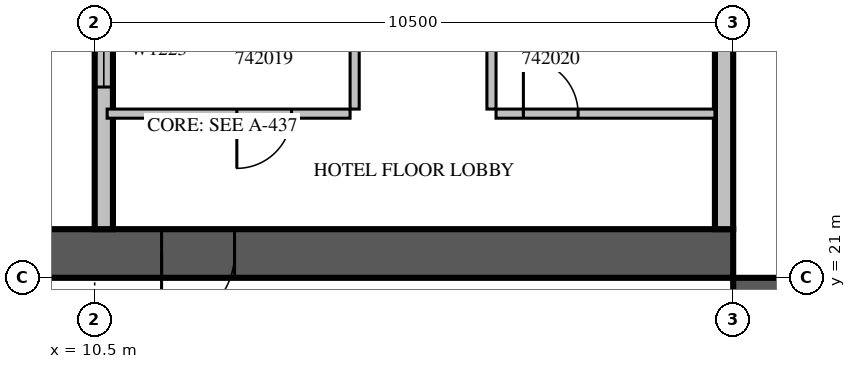
"""IFC4 building model, lengths in metres.
Left out: names, types, materials, properties, quantities, classifications, styles, units other than length and angle.
Written with IfcOpenShell. Run it as: python <this file> out.ifc"""

import sys

from ifc_helpers import new_model, si_unit, direction, frame, frame_2d, origin, place, context, subcontext, project, spatial, rectangle, extrude, source, transform, mapped, element, fill, save


model = new_model("IFC4")
c1 = context("Model", 3, precision=1e-05, world=origin(), true_north=direction((0.0, 1.0)))
c2 = subcontext(c1, "Body", "Model", "MODEL_VIEW")
j1 = project(units=[si_unit("LENGTHUNIT", "METRE"), si_unit("PLANEANGLEUNIT", "RADIAN")], contexts=[c1])
p1 = place(None, origin())
s1 = spatial("IfcSite", under=j1, at=p1, CompositionType="ELEMENT")
p2 = place(p1, origin())
s2 = spatial("IfcBuilding", under=s1, at=p2, CompositionType="ELEMENT")
p3 = place(p2, frame((0.0, 0.0, 193.0)))
s3 = spatial("IfcBuildingStorey", under=s2, at=p3, CompositionType="ELEMENT", Elevation=193.0)
m1 = source(origin(), c2, "Body", "SweptSolid", [
    extrude(rectangle(XDim=16.8, YDim=0.8, at=frame_2d((8.4, 0.0))), origin(), (0.0, 0.0, 1.0), 3.8),
])
p4 = place(p3, frame((21.4, 4.2, 0.0), z_axis=(0.0, 0.0, 1.0), x_axis=(0.0, 1.0, 0.0)))
e1 = element("IfcWall", 1, at=p4, inside=s3, PredefinedType="SHEAR", context=c2, shape_type="MappedRepresentation", body=[
    mapped(m1, transform((0.0, 0.0, 0.0), scale=1.0)),
])
m2 = source(origin(), c2, "Body", "SweptSolid", [
    extrude(rectangle(XDim=2.2, YDim=2.1, at=frame_2d((1.1, 1.05))), frame((0.0, 0.41, 0.0), z_axis=(0.0, -1.0, 0.0), x_axis=(1.0, 0.0, 0.0)), (0.0, 0.0, 1.0), 0.82),
])
p5 = place(p4, frame((4.2, 0.0, 0.0)))
e2 = element("IfcOpeningElement", 2, at=p5, cuts=e1, PredefinedType="OPENING", context=c2, shape_type="MappedRepresentation", body=[
    mapped(m2, transform((0.0, 0.0, 0.0), scale=1.0)),
])
m3 = source(origin(), c2, "Body", "SweptSolid", [
    extrude(rectangle(XDim=1.2, YDim=2.1, at=frame_2d((0.6, 1.05))), frame((0.0, 0.41, 0.0), z_axis=(0.0, -1.0, 0.0), x_axis=(1.0, 0.0, 0.0)), (0.0, 0.0, 1.0), 0.82),
])
p6 = place(p4, frame((14.7, 0.0, 0.0)))
e3 = element("IfcOpeningElement", 3, at=p6, cuts=e1, PredefinedType="OPENING", context=c2, shape_type="MappedRepresentation", body=[
    mapped(m3, transform((0.0, 0.0, 0.0), scale=1.0)),
])
p7 = place(p3, frame((4.2, 21.4, 0.0), z_axis=(0.0, 0.0, 1.0), x_axis=(1.0, 0.0, 0.0)))
e4 = element("IfcWall", 4, at=p7, inside=s3, PredefinedType="SHEAR", context=c2, shape_type="MappedRepresentation", body=[
    mapped(m1, transform((0.0, 0.0, 0.0), scale=1.0)),
])
p8 = place(p7, frame((7.4, 0.0, 0.0)))
e5 = element("IfcOpeningElement", 5, at=p8, cuts=e4, PredefinedType="OPENING", context=c2, shape_type="MappedRepresentation", body=[
    mapped(m3, transform((0.0, 0.0, 0.0), scale=1.0)),
])
m4 = source(origin(), c2, "Body", "SweptSolid", [
    extrude(rectangle(XDim=7.15, YDim=0.3, at=frame_2d((3.575, 0.0))), origin(), (0.0, 0.0, 1.0), 3.4),
])
p9 = place(p3, frame((20.85, 21.8, 0.0), z_axis=(0.0, 0.0, 1.0), x_axis=(0.0, 1.0, 0.0)))
e6 = element("IfcWall", 6, at=p9, inside=s3, PredefinedType="STANDARD", context=c2, shape_type="MappedRepresentation", body=[
    mapped(m4, transform((0.0, 0.0, 0.0), scale=1.0)),
])
m5 = source(origin(), c2, "Body", "SweptSolid", [
    extrude(rectangle(XDim=3.0, YDim=2.3, at=frame_2d((1.5, 1.15))), frame((0.0, 0.16, 0.0), z_axis=(0.0, -1.0, 0.0), x_axis=(1.0, 0.0, 0.0)), (0.0, 0.0, 1.0), 0.32),
])
p10 = place(p9, frame((4.0, 0.0, 0.6)))
e7 = element("IfcOpeningElement", 7, at=p10, cuts=e6, PredefinedType="OPENING", context=c2, shape_type="MappedRepresentation", body=[
    mapped(m5, transform((0.0, 0.0, 0.0), scale=1.0)),
])
p11 = place(p3, frame((10.65, 28.95, 0.0), z_axis=(0.0, 0.0, 1.0), x_axis=(0.0, -1.0, 0.0)))
e8 = element("IfcWall", 8, at=p11, inside=s3, PredefinedType="STANDARD", context=c2, shape_type="MappedRepresentation", body=[
    mapped(m4, transform((0.0, 0.0, 0.0), scale=1.0)),
])
m6 = source(origin(), c2, "Body", "SweptSolid", [
    extrude(rectangle(XDim=1.8, YDim=2.3, at=frame_2d((0.9, 1.15))), frame((0.0, 0.16, 0.0), z_axis=(0.0, -1.0, 0.0), x_axis=(1.0, 0.0, 0.0)), (0.0, 0.0, 1.0), 0.32),
])
p12 = place(p11, frame((0.15, 0.0, 0.6)))
e9 = element("IfcOpeningElement", 9, at=p12, cuts=e8, PredefinedType="OPENING", context=c2, shape_type="MappedRepresentation", body=[
    mapped(m6, transform((0.0, 0.0, 0.0), scale=1.0)),
])
m7 = source(origin(), c2, "Body", "SweptSolid", [
    extrude(rectangle(XDim=1.2, YDim=2.3, at=frame_2d((0.6, 1.15))), frame((0.0, 0.16, 0.0), z_axis=(0.0, -1.0, 0.0), x_axis=(1.0, 0.0, 0.0)), (0.0, 0.0, 1.0), 0.32),
])
p13 = place(p11, frame((3.612, 0.0, 0.6)))
e10 = element("IfcOpeningElement", 10, at=p13, cuts=e8, PredefinedType="OPENING", context=c2, shape_type="MappedRepresentation", body=[
    mapped(m7, transform((0.0, 0.0, 0.0), scale=1.0)),
])
p14 = place(p3, frame((10.705, 23.7, 0.0), z_axis=(0.0, 0.0, 1.0), x_axis=(1.0, 0.0, 0.0)))
e11 = element("IfcWall", 11, at=p14, inside=s3, PredefinedType="PARTITIONING", context=c2, shape_type="SweptSolid", body=[
    extrude(rectangle(XDim=3.995, YDim=0.15, at=frame_2d((1.998, 0.0))), origin(), (0.0, 0.0, 1.0), 3.4),
])
m8 = source(origin(), c2, "Body", "SweptSolid", [
    extrude(rectangle(XDim=0.9, YDim=2.1, at=frame_2d((0.45, 1.05))), frame((0.0, 0.085, 0.0), z_axis=(0.0, -1.0, 0.0), x_axis=(1.0, 0.0, 0.0)), (0.0, 0.0, 1.0), 0.17),
])
p15 = place(p14, frame((2.132, 0.0, 0.0)))
e12 = element("IfcOpeningElement", 12, at=p15, cuts=e11, PredefinedType="OPENING", context=c2, shape_type="MappedRepresentation", body=[
    mapped(m8, transform((0.0, 0.0, 0.0), scale=1.0)),
])
m9 = source(origin(), c2, "Body", "SweptSolid", [
    extrude(rectangle(XDim=3.6, YDim=0.15, at=frame_2d((1.8, 0.0))), origin(), (0.0, 0.0, 1.0), 3.4),
])
p16 = place(p3, frame((17.1, 23.7, 0.0), z_axis=(0.0, 0.0, 1.0), x_axis=(1.0, 0.0, 0.0)))
e13 = element("IfcWall", 13, at=p16, inside=s3, PredefinedType="PARTITIONING", context=c2, shape_type="MappedRepresentation", body=[
    mapped(m9, transform((0.0, 0.0, 0.0), scale=1.0)),
])
p17 = place(p16, frame((0.45, 0.0, 0.0)))
e14 = element("IfcOpeningElement", 14, at=p17, cuts=e13, PredefinedType="OPENING", context=c2, shape_type="MappedRepresentation", body=[
    mapped(m8, transform((0.0, 0.0, 0.0), scale=1.0)),
])
m10 = source(origin(), c2, "Body", "SweptSolid", [
    extrude(rectangle(XDim=5.55, YDim=0.15, at=frame_2d((2.775, 0.0))), origin(), (0.0, 0.0, 1.0), 3.4),
])
for number, where, z_axis, x_axis in (
    (15, (14.775, 23.775, 0.0), (0.0, 0.0, 1.0), (0.0, 1.0, 0.0)),
    (16, (17.025, 29.325, 0.0), (0.0, 0.0, 1.0), (0.0, -1.0, 0.0)),
):
    element("IfcWall", number, at=place(p3, frame(where, z_axis=z_axis, x_axis=x_axis)), inside=s3, PredefinedType="PARTITIONING", context=c2, shape_type="MappedRepresentation", body=[
        mapped(m10, transform((0.0, 0.0, 0.0), scale=1.0)),
    ])
m11 = source(origin(), c2, "Body", "SweptSolid", [
    extrude(rectangle(XDim=1.2, YDim=2.3, at=frame_2d((0.6, 1.15))), frame((0.0, 0.03, 0.0), z_axis=(0.0, -1.0, 0.0), x_axis=(1.0, 0.0, 0.0)), (0.0, 0.0, 1.0), 0.06),
])
p18 = place(p13, origin())
e17 = element("IfcWindow", 17, at=p18, inside=s3, PartitioningType="SINGLE_PANEL", PredefinedType="WINDOW", context=c2, shape_type="MappedRepresentation", body=[
    mapped(m11, transform((0.0, 0.0, 0.0), scale=1.0)),
])
fill(e10, e17)
m12 = source(origin(), c2, "Body", "SweptSolid", [
    extrude(rectangle(XDim=1.2, YDim=2.1, at=frame_2d((0.6, 1.05))), frame((0.0, 0.025, 0.0), z_axis=(0.0, -1.0, 0.0), x_axis=(1.0, 0.0, 0.0)), (0.0, 0.0, 1.0), 0.05),
])
p19 = place(p8, origin())
e18 = element("IfcDoor", 18, at=p19, inside=s3, OperationType="SINGLE_SWING_RIGHT", PredefinedType="DOOR", context=c2, shape_type="MappedRepresentation", body=[
    mapped(m12, transform((0.0, 0.0, 0.0), scale=1.0)),
])
fill(e5, e18)
m13 = source(origin(), c2, "Body", "SweptSolid", [
    extrude(rectangle(XDim=0.9, YDim=2.1, at=frame_2d((0.45, 1.05))), frame((0.0, 0.025, 0.0), z_axis=(0.0, -1.0, 0.0), x_axis=(1.0, 0.0, 0.0)), (0.0, 0.0, 1.0), 0.05),
])
p20 = place(p15, origin())
e19 = element("IfcDoor", 19, at=p20, inside=s3, OperationType="SINGLE_SWING_RIGHT", PredefinedType="DOOR", context=c2, shape_type="MappedRepresentation", body=[
    mapped(m13, transform((0.0, 0.0, 0.0), scale=1.0)),
])
fill(e12, e19)
p21 = place(p17, origin())
e20 = element("IfcDoor", 20, at=p21, inside=s3, OperationType="SINGLE_SWING_LEFT", PredefinedType="DOOR", context=c2, shape_type="MappedRepresentation", body=[
    mapped(m13, transform((0.0, 0.0, 0.0), scale=1.0)),
])
fill(e14, e20)
save(model, sys.argv[1])
